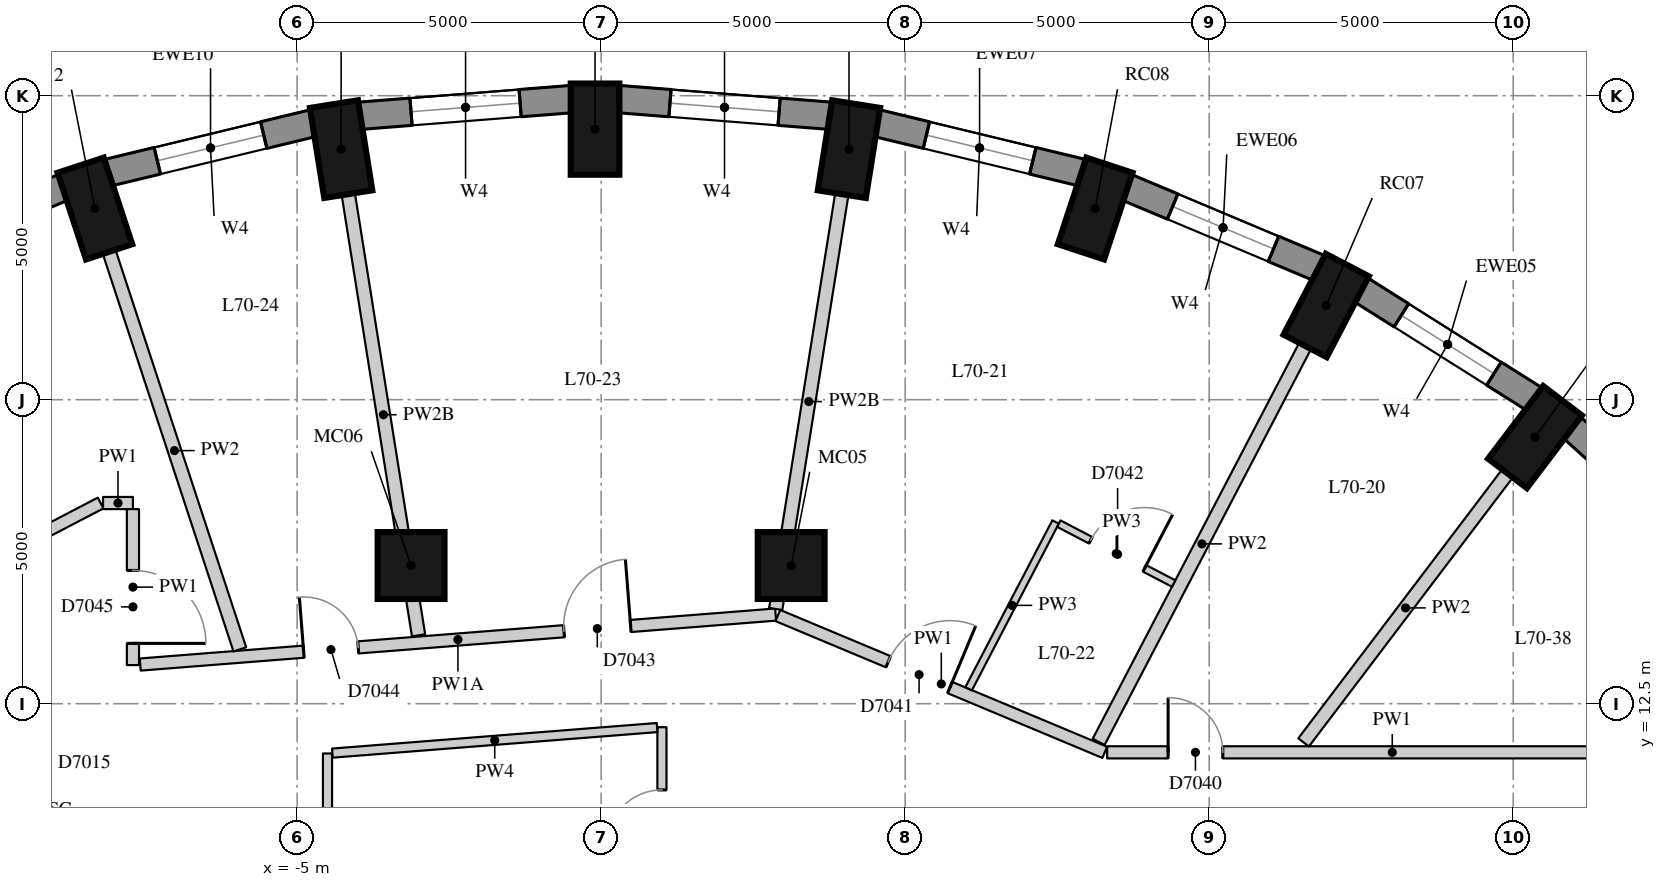
"""IFC4 building model, lengths in metres.
Left out: names, types, materials, properties, quantities, classifications, styles, units other than length and angle.
Written with IfcOpenShell. Run it as: python <this file> out.ifc"""

import sys

from ifc_helpers import new_model, si_unit, direction, frame, frame_2d, origin, origin_2d, place, context, subcontext, project, spatial, rectangle, extrude, element, fill, save


model = new_model("IFC4")
c1 = context("Model", 3, precision=1e-05, world=origin(), true_north=direction((0.0, 1.0)))
c2 = subcontext(c1, "Body", "Model", "MODEL_VIEW")
j1 = project(units=[si_unit("LENGTHUNIT", "METRE"), si_unit("PLANEANGLEUNIT", "RADIAN")], contexts=[c1])
p1 = place(None, origin())
s1 = spatial("IfcSite", under=j1, at=p1, CompositionType="ELEMENT")
p2 = place(p1, origin())
s2 = spatial("IfcBuilding", under=s1, at=p2, CompositionType="ELEMENT")
p3 = place(p2, frame((0.0, 0.0, 246.5)))
s3 = spatial("IfcBuildingStorey", under=s2, at=p3, CompositionType="ELEMENT", Elevation=246.5)
for number, where, z_axis, x_axis in (
    (1, (15.359, 16.885, 0.0), (0.0, 0.0, 1.0), (0.604, 0.797, 0.0)),
    (2, (11.925, 19.05, 0.0), (0.0, 0.0, 1.0), (0.462, 0.887, 0.0)),
    (3, (8.125, 20.644, 0.0), (0.0, 0.0, 1.0), (0.312, 0.95, 0.0)),
    (4, (4.076, 21.621, 0.0), (0.0, 0.0, 1.0), (0.157, 0.988, 0.0)),
    (5, (-0.1, 21.95, 0.0), (0.0, 0.0, 1.0), (0.0, 1.0, 0.0)),
    (6, (-4.276, 21.621, 0.0), (0.0, 0.0, 1.0), (-0.157, 0.988, 0.0)),
    (7, (-8.326, 20.644, 0.0), (0.0, 0.0, 1.0), (-0.312, 0.95, 0.0)),
):
    element("IfcColumn", number, at=place(p3, frame(where, z_axis=z_axis, x_axis=x_axis)), inside=s3, PredefinedType="COLUMN", context=c2, shape_type="SweptSolid", body=[
        extrude(rectangle(XDim=1.5, YDim=0.8, at=origin_2d()), origin(), (0.0, 0.0, 1.0), 3.3),
    ])
for number, where, z_axis, x_axis in (
    (8, (3.126, 14.772, 0.0), (0.0, 0.0, 1.0), (1.0, 0.0, 0.0)),
    (9, (-3.126, 14.772, 0.0), (0.0, 0.0, 1.0), (1.0, 0.0, 0.0)),
):
    element("IfcColumn", number, at=place(p3, frame(where, z_axis=z_axis, x_axis=x_axis)), inside=s3, PredefinedType="COLUMN", context=c2, shape_type="SweptSolid", body=[
        extrude(rectangle(XDim=1.1, YDim=1.1, at=origin_2d()), origin(), (0.0, 0.0, 1.0), 3.3),
    ])
p4 = place(p3, frame((18.424, 14.828, 0.0), z_axis=(0.0, 0.0, 1.0), x_axis=(-0.743166014219, 0.669107073128, 0.0)))
e10 = element("IfcWall", 10, at=p4, inside=s3, PredefinedType="SOLIDWALL", context=c2, shape_type="SweptSolid", body=[
    extrude(rectangle(XDim=3.316, YDim=0.45, at=frame_2d((1.658, 0.0))), origin(), (0.0, 0.0, 1.0), 3.02),
])
p5 = place(p3, frame((15.353, 17.506, 0.0), z_axis=(0.0, 0.0, 1.0), x_axis=(-0.845929139811, 0.53329531258, 0.0)))
e11 = element("IfcWall", 11, at=p5, inside=s3, PredefinedType="SOLIDWALL", context=c2, shape_type="SweptSolid", body=[
    extrude(rectangle(XDim=3.385, YDim=0.45, at=frame_2d((1.692, 0.0))), origin(), (0.0, 0.0, 1.0), 3.02),
])
p6 = place(p5, frame((0.792, 0.0, 0.4)))
e12 = element("IfcOpeningElement", 12, at=p6, cuts=e11, PredefinedType="OPENING", context=c2, shape_type="SweptSolid", body=[
    extrude(rectangle(XDim=1.8, YDim=1.75, at=frame_2d((0.9, 0.875))), frame((0.0, 0.235, 0.0), z_axis=(0.0, -1.0, 0.0), x_axis=(1.0, 0.0, 0.0)), (0.0, 0.0, 1.0), 0.47),
])
p7 = place(p3, frame((11.816, 19.662, 0.0), z_axis=(0.0, 0.0, 1.0), x_axis=(-0.922024627475, 0.387131226239, 0.0)))
e13 = element("IfcWall", 13, at=p7, inside=s3, PredefinedType="SOLIDWALL", context=c2, shape_type="SweptSolid", body=[
    extrude(rectangle(XDim=3.443, YDim=0.45, at=frame_2d((1.722, 0.0))), origin(), (0.0, 0.0, 1.0), 3.02),
])
p8 = place(p7, frame((0.822, 0.0, 0.4)))
e14 = element("IfcOpeningElement", 14, at=p8, cuts=e13, PredefinedType="OPENING", context=c2, shape_type="SweptSolid", body=[
    extrude(rectangle(XDim=1.8, YDim=1.75, at=frame_2d((0.9, 0.875))), frame((0.0, 0.235, 0.0), z_axis=(0.0, -1.0, 0.0), x_axis=(1.0, 0.0, 0.0)), (0.0, 0.0, 1.0), 0.47),
])
p9 = place(p3, frame((7.919, 21.232, 0.0), z_axis=(0.0, 0.0, 1.0), x_axis=(-0.972099278496, 0.23456980357, 0.0)))
e15 = element("IfcWall", 15, at=p9, inside=s3, PredefinedType="SOLIDWALL", context=c2, shape_type="SweptSolid", body=[
    extrude(rectangle(XDim=3.487, YDim=0.45, at=frame_2d((1.743, 0.0))), origin(), (0.0, 0.0, 1.0), 3.02),
])
p10 = place(p9, frame((0.843, 0.0, 0.4)))
e16 = element("IfcOpeningElement", 16, at=p10, cuts=e15, PredefinedType="OPENING", context=c2, shape_type="SweptSolid", body=[
    extrude(rectangle(XDim=1.8, YDim=1.75, at=frame_2d((0.9, 0.875))), frame((0.0, 0.235, 0.0), z_axis=(0.0, -1.0, 0.0), x_axis=(1.0, 0.0, 0.0)), (0.0, 0.0, 1.0), 0.47),
])
p11 = place(p3, frame((3.779, 22.169, 0.0), z_axis=(0.0, 0.0, 1.0), x_axis=(-0.996910775835, 0.078542377245, 0.0)))
e17 = element("IfcWall", 17, at=p11, inside=s3, PredefinedType="SOLIDWALL", context=c2, shape_type="SweptSolid", body=[
    extrude(rectangle(XDim=3.509, YDim=0.45, at=frame_2d((1.755, 0.0))), origin(), (0.0, 0.0, 1.0), 3.02),
])
p12 = place(p11, frame((0.855, 0.0, 0.4)))
e18 = element("IfcOpeningElement", 18, at=p12, cuts=e17, PredefinedType="OPENING", context=c2, shape_type="SweptSolid", body=[
    extrude(rectangle(XDim=1.8, YDim=1.75, at=frame_2d((0.9, 0.875))), frame((0.0, 0.235, 0.0), z_axis=(0.0, -1.0, 0.0), x_axis=(1.0, 0.0, 0.0)), (0.0, 0.0, 1.0), 0.47),
])
p13 = place(p3, frame((-0.48, 22.444, 0.0), z_axis=(0.0, 0.0, 1.0), x_axis=(-0.996910775835, -0.078542377245, 0.0)))
e19 = element("IfcWall", 19, at=p13, inside=s3, PredefinedType="SOLIDWALL", context=c2, shape_type="SweptSolid", body=[
    extrude(rectangle(XDim=3.509, YDim=0.45, at=frame_2d((1.755, 0.0))), origin(), (0.0, 0.0, 1.0), 3.02),
])
p14 = place(p13, frame((0.855, 0.0, 0.4)))
e20 = element("IfcOpeningElement", 20, at=p14, cuts=e19, PredefinedType="OPENING", context=c2, shape_type="SweptSolid", body=[
    extrude(rectangle(XDim=1.8, YDim=1.75, at=frame_2d((0.9, 0.875))), frame((0.0, 0.235, 0.0), z_axis=(0.0, -1.0, 0.0), x_axis=(1.0, 0.0, 0.0)), (0.0, 0.0, 1.0), 0.47),
])
p15 = place(p3, frame((-4.729, 22.05, 0.0), z_axis=(0.0, 0.0, 1.0), x_axis=(-0.972099278496, -0.23456980357, 0.0)))
e21 = element("IfcWall", 21, at=p15, inside=s3, PredefinedType="SOLIDWALL", context=c2, shape_type="SweptSolid", body=[
    extrude(rectangle(XDim=3.487, YDim=0.45, at=frame_2d((1.743, 0.0))), origin(), (0.0, 0.0, 1.0), 3.02),
])
p16 = place(p15, frame((0.843, 0.0, 0.4)))
e22 = element("IfcOpeningElement", 22, at=p16, cuts=e21, PredefinedType="OPENING", context=c2, shape_type="SweptSolid", body=[
    extrude(rectangle(XDim=1.8, YDim=1.75, at=frame_2d((0.9, 0.875))), frame((0.0, 0.235, 0.0), z_axis=(0.0, -1.0, 0.0), x_axis=(1.0, 0.0, 0.0)), (0.0, 0.0, 1.0), 0.47),
])
p17 = place(p3, frame((-8.841, 20.995, 0.0), z_axis=(0.0, 0.0, 1.0), x_axis=(-0.922024627475, -0.387131226239, 0.0)))
e23 = element("IfcWall", 23, at=p17, inside=s3, PredefinedType="SOLIDWALL", context=c2, shape_type="SweptSolid", body=[
    extrude(rectangle(XDim=3.443, YDim=0.45, at=frame_2d((1.722, 0.0))), origin(), (0.0, 0.0, 1.0), 3.02),
])
p18 = place(p17, frame((0.822, 0.0, 0.4)))
e24 = element("IfcOpeningElement", 24, at=p18, cuts=e23, PredefinedType="OPENING", context=c2, shape_type="SweptSolid", body=[
    extrude(rectangle(XDim=1.8, YDim=1.75, at=frame_2d((0.9, 0.875))), frame((0.0, 0.235, 0.0), z_axis=(0.0, -1.0, 0.0), x_axis=(1.0, 0.0, 0.0)), (0.0, 0.0, 1.0), 0.47),
])
p19 = place(p3, frame((-11.534, 14.081, 0.0), z_axis=(0.0, 0.0, 1.0), x_axis=(0.886975089277, 0.461817270143, 0.0)))
e25 = element("IfcWall", 25, at=p19, inside=s3, PredefinedType="PARTITIONING", context=c2, shape_type="SweptSolid", body=[
    extrude(rectangle(XDim=3.723, YDim=0.2, at=frame_2d((1.861, 0.0))), origin(), (0.0, 0.0, 1.0), 3.02),
])
p20 = place(p3, frame((-8.192, 15.8, 0.0), z_axis=(0.0, 0.0, 1.0), x_axis=(1.0, 0.0, 0.0)))
e26 = element("IfcWall", 26, at=p20, inside=s3, PredefinedType="PARTITIONING", context=c2, shape_type="SweptSolid", body=[
    extrude(rectangle(XDim=0.492, YDim=0.2, at=frame_2d((0.246, 0.0))), origin(), (0.0, 0.0, 1.0), 3.02),
])
p21 = place(p3, frame((-7.7, 15.7, 0.0), z_axis=(0.0, 0.0, 1.0), x_axis=(0.0, -1.0, 0.0)))
e27 = element("IfcWall", 27, at=p21, inside=s3, PredefinedType="PARTITIONING", context=c2, shape_type="SweptSolid", body=[
    extrude(rectangle(XDim=2.565, YDim=0.2, at=frame_2d((1.282, 0.0))), origin(), (0.0, 0.0, 1.0), 3.02),
])
p22 = place(p21, frame((1.008, 0.0, 0.0)))
e28 = element("IfcOpeningElement", 28, at=p22, cuts=e27, PredefinedType="OPENING", context=c2, shape_type="SweptSolid", body=[
    extrude(rectangle(XDim=1.2, YDim=2.1, at=frame_2d((0.6, 1.05))), frame((0.0, 0.11, 0.0), z_axis=(0.0, -1.0, 0.0), x_axis=(1.0, 0.0, 0.0)), (0.0, 0.0, 1.0), 0.22),
])
p23 = place(p3, frame((-7.58, 13.144, 0.0), z_axis=(0.0, 0.0, 1.0), x_axis=(0.996921908045, 0.078400951905, 0.0)))
e29 = element("IfcWall", 29, at=p23, inside=s3, PredefinedType="PARTITIONING", context=c2, shape_type="SweptSolid", body=[
    extrude(rectangle(XDim=10.482, YDim=0.2, at=frame_2d((5.241, 0.0))), origin(), (0.0, 0.0, 1.0), 2.57),
])
p24 = place(p23, frame((6.99, 0.0, 0.0)))
e30 = element("IfcOpeningElement", 30, at=p24, cuts=e29, PredefinedType="OPENING", context=c2, shape_type="SweptSolid", body=[
    extrude(rectangle(XDim=1.1, YDim=2.1, at=frame_2d((0.55, 1.05))), frame((0.0, 0.11, 0.0), z_axis=(0.0, -1.0, 0.0), x_axis=(1.0, 0.0, 0.0)), (0.0, 0.0, 1.0), 0.22),
])
p25 = place(p23, frame((2.696, 0.0, 0.0)))
e31 = element("IfcOpeningElement", 31, at=p25, cuts=e29, PredefinedType="OPENING", context=c2, shape_type="SweptSolid", body=[
    extrude(rectangle(XDim=0.9, YDim=2.1, at=frame_2d((0.45, 1.05))), frame((0.0, 0.11, 0.0), z_axis=(0.0, -1.0, 0.0), x_axis=(1.0, 0.0, 0.0)), (0.0, 0.0, 1.0), 0.22),
])
p26 = place(p3, frame((2.907, 13.95, 0.0), z_axis=(0.0, 0.0, 1.0), x_axis=(0.922453481254, -0.386108242494, 0.0)))
e32 = element("IfcWall", 32, at=p26, inside=s3, PredefinedType="PARTITIONING", context=c2, shape_type="SweptSolid", body=[
    extrude(rectangle(XDim=5.827, YDim=0.2, at=frame_2d((2.914, 0.0))), origin(), (0.0, 0.0, 1.0), 3.02),
])
p27 = place(p26, frame((1.968, 0.0, 0.0)))
e33 = element("IfcOpeningElement", 33, at=p27, cuts=e32, PredefinedType="OPENING", context=c2, shape_type="SweptSolid", body=[
    extrude(rectangle(XDim=1.1, YDim=2.1, at=frame_2d((0.55, 1.05))), frame((0.0, 0.11, 0.0), z_axis=(0.0, -1.0, 0.0), x_axis=(1.0, 0.0, 0.0)), (0.0, 0.0, 1.0), 0.22),
])
p28 = place(p3, frame((8.322, 11.7, 0.0), z_axis=(0.0, 0.0, 1.0), x_axis=(1.0, 0.0, 0.0)))
e34 = element("IfcWall", 34, at=p28, inside=s3, PredefinedType="PARTITIONING", context=c2, shape_type="SweptSolid", body=[
    extrude(rectangle(XDim=9.378, YDim=0.2, at=frame_2d((4.689, 0.0))), origin(), (0.0, 0.0, 1.0), 3.02),
])
p29 = place(p28, frame((1.002, 0.0, 0.0)))
e35 = element("IfcOpeningElement", 35, at=p29, cuts=e34, PredefinedType="OPENING", context=c2, shape_type="SweptSolid", body=[
    extrude(rectangle(XDim=0.9, YDim=2.1, at=frame_2d((0.45, 1.05))), frame((0.0, 0.11, 0.0), z_axis=(0.0, -1.0, 0.0), x_axis=(1.0, 0.0, 0.0)), (0.0, 0.0, 1.0), 0.22),
])
p30 = place(p3, frame((1.0, 12.113, 0.0), z_axis=(0.0, 0.0, 1.0), x_axis=(0.0, -1.0, 0.0)))
e36 = element("IfcWall", 36, at=p30, inside=s3, PredefinedType="PARTITIONING", context=c2, shape_type="SweptSolid", body=[
    extrude(rectangle(XDim=2.963, YDim=0.15, at=frame_2d((1.482, 0.0))), origin(), (0.0, 0.0, 1.0), 3.02),
])
p31 = place(p30, frame((1.032, 0.0, 0.0)))
e37 = element("IfcOpeningElement", 37, at=p31, cuts=e36, PredefinedType="OPENING", context=c2, shape_type="SweptSolid", body=[
    extrude(rectangle(XDim=0.9, YDim=2.1, at=frame_2d((0.45, 1.05))), frame((0.0, 0.085, 0.0), z_axis=(0.0, -1.0, 0.0), x_axis=(1.0, 0.0, 0.0)), (0.0, 0.0, 1.0), 0.17),
])
p32 = place(p3, frame((-4.5, 7.735, 0.0), z_axis=(0.0, 0.0, 1.0), x_axis=(0.0, 1.0, 0.0)))
e38 = element("IfcWall", 38, at=p32, inside=s3, PredefinedType="PARTITIONING", context=c2, shape_type="SweptSolid", body=[
    extrude(rectangle(XDim=3.946, YDim=0.15, at=frame_2d((1.973, 0.0))), origin(), (0.0, 0.0, 1.0), 3.02),
])
p33 = place(p3, frame((-4.42, 11.687, 0.0), z_axis=(0.0, 0.0, 1.0), x_axis=(0.996915064954, 0.078487917971, 0.0)))
e39 = element("IfcWall", 39, at=p33, inside=s3, PredefinedType="PARTITIONING", context=c2, shape_type="SweptSolid", body=[
    extrude(rectangle(XDim=5.356, YDim=0.15, at=frame_2d((2.678, 0.0))), origin(), (0.0, 0.0, 1.0), 3.02),
])
p34 = place(p3, frame((14.906, 16.287, 0.0), z_axis=(0.0, 0.0, 1.0), x_axis=(-0.604066831727, -0.796933662739, 0.0)))
e40 = element("IfcWall", 40, at=p34, inside=s3, PredefinedType="PARTITIONING", context=c2, shape_type="SweptSolid", body=[
    extrude(rectangle(XDim=5.551, YDim=0.22, at=frame_2d((2.775, 0.0))), origin(), (0.0, 0.0, 1.0), 3.02),
])
p35 = place(p3, frame((11.578, 18.385, 0.0), z_axis=(0.0, 0.0, 1.0), x_axis=(-0.462372875873, -0.886685583314, 0.0)))
e41 = element("IfcWall", 41, at=p35, inside=s3, PredefinedType="PARTITIONING", context=c2, shape_type="SweptSolid", body=[
    extrude(rectangle(XDim=7.345, YDim=0.22, at=frame_2d((3.672, 0.0))), origin(), (0.0, 0.0, 1.0), 3.02),
])
p36 = place(p3, frame((3.958, 20.88, 0.0), z_axis=(0.0, 0.0, 1.0), x_axis=(-0.157259964952, -0.987557240581, 0.0)))
e42 = element("IfcWall", 42, at=p36, inside=s3, PredefinedType="PARTITIONING", context=c2, shape_type="SweptSolid", body=[
    extrude(rectangle(XDim=6.908, YDim=0.22, at=frame_2d((3.454, 0.0))), origin(), (0.0, 0.0, 1.0), 2.57),
])
p37 = place(p3, frame((-4.158, 20.88, 0.0), z_axis=(0.0, 0.0, 1.0), x_axis=(0.157271196312, -0.987555452018, 0.0)))
e43 = element("IfcWall", 43, at=p37, inside=s3, PredefinedType="PARTITIONING", context=c2, shape_type="SweptSolid", body=[
    extrude(rectangle(XDim=7.347, YDim=0.22, at=frame_2d((3.674, 0.0))), origin(), (0.0, 0.0, 1.0), 2.57),
])
p38 = place(p3, frame((-8.091, 19.932, 0.0), z_axis=(0.0, 0.0, 1.0), x_axis=(0.312277225251, -0.949991018162, 0.0)))
e44 = element("IfcWall", 44, at=p38, inside=s3, PredefinedType="PARTITIONING", context=c2, shape_type="SweptSolid", body=[
    extrude(rectangle(XDim=6.883, YDim=0.22, at=frame_2d((3.441, 0.0))), origin(), (0.0, 0.0, 1.0), 3.02),
])
p39 = place(p3, frame((6.044, 12.745, 0.0), z_axis=(0.0, 0.0, 1.0), x_axis=(0.462331372195, 0.886707224672, 0.0)))
e45 = element("IfcWall", 45, at=p39, inside=s3, PredefinedType="PARTITIONING", context=c2, shape_type="SweptSolid", body=[
    extrude(rectangle(XDim=3.094, YDim=0.12, at=frame_2d((1.547, 0.0))), origin(), (0.0, 0.0, 1.0), 3.02),
])
p40 = place(p3, frame((7.527, 15.461, 0.0), z_axis=(0.0, 0.0, 1.0), x_axis=(0.88668701022, -0.462370139507, 0.0)))
e46 = element("IfcWall", 46, at=p40, inside=s3, PredefinedType="PARTITIONING", context=c2, shape_type="SweptSolid", body=[
    extrude(rectangle(XDim=2.13, YDim=0.12, at=frame_2d((1.065, 0.0))), origin(), (0.0, 0.0, 1.0), 3.02),
])
p41 = place(p40, frame((0.59, 0.0, 0.0)))
e47 = element("IfcOpeningElement", 47, at=p41, cuts=e46, PredefinedType="OPENING", context=c2, shape_type="SweptSolid", body=[
    extrude(rectangle(XDim=1.0, YDim=2.1, at=frame_2d((0.5, 1.05))), frame((0.0, 0.07, 0.0), z_axis=(0.0, -1.0, 0.0), x_axis=(1.0, 0.0, 0.0)), (0.0, 0.0, 1.0), 0.14),
])
p42 = place(p6, origin())
e48 = element("IfcWindow", 48, at=p42, inside=s3, PartitioningType="SINGLE_PANEL", PredefinedType="WINDOW", context=c2, shape_type="SweptSolid", body=[
    extrude(rectangle(XDim=1.8, YDim=1.75, at=frame_2d((0.9, 0.875))), frame((0.0, 0.035, 0.0), z_axis=(0.0, -1.0, 0.0), x_axis=(1.0, 0.0, 0.0)), (0.0, 0.0, 1.0), 0.06),
])
fill(e12, e48)
p43 = place(p8, origin())
e49 = element("IfcWindow", 49, at=p43, inside=s3, PartitioningType="SINGLE_PANEL", PredefinedType="WINDOW", context=c2, shape_type="SweptSolid", body=[
    extrude(rectangle(XDim=1.8, YDim=1.75, at=frame_2d((0.9, 0.875))), frame((0.0, 0.035, 0.0), z_axis=(0.0, -1.0, 0.0), x_axis=(1.0, 0.0, 0.0)), (0.0, 0.0, 1.0), 0.06),
])
fill(e14, e49)
p44 = place(p10, origin())
e50 = element("IfcWindow", 50, at=p44, inside=s3, PartitioningType="SINGLE_PANEL", PredefinedType="WINDOW", context=c2, shape_type="SweptSolid", body=[
    extrude(rectangle(XDim=1.8, YDim=1.75, at=frame_2d((0.9, 0.875))), frame((0.0, 0.035, 0.0), z_axis=(0.0, -1.0, 0.0), x_axis=(1.0, 0.0, 0.0)), (0.0, 0.0, 1.0), 0.06),
])
fill(e16, e50)
p45 = place(p12, origin())
e51 = element("IfcWindow", 51, at=p45, inside=s3, PartitioningType="SINGLE_PANEL", PredefinedType="WINDOW", context=c2, shape_type="SweptSolid", body=[
    extrude(rectangle(XDim=1.8, YDim=1.75, at=frame_2d((0.9, 0.875))), frame((0.0, 0.035, 0.0), z_axis=(0.0, -1.0, 0.0), x_axis=(1.0, 0.0, 0.0)), (0.0, 0.0, 1.0), 0.06),
])
fill(e18, e51)
p46 = place(p14, origin())
e52 = element("IfcWindow", 52, at=p46, inside=s3, PartitioningType="SINGLE_PANEL", PredefinedType="WINDOW", context=c2, shape_type="SweptSolid", body=[
    extrude(rectangle(XDim=1.8, YDim=1.75, at=frame_2d((0.9, 0.875))), frame((0.0, 0.035, 0.0), z_axis=(0.0, -1.0, 0.0), x_axis=(1.0, 0.0, 0.0)), (0.0, 0.0, 1.0), 0.06),
])
fill(e20, e52)
p47 = place(p16, origin())
e53 = element("IfcWindow", 53, at=p47, inside=s3, PartitioningType="SINGLE_PANEL", PredefinedType="WINDOW", context=c2, shape_type="SweptSolid", body=[
    extrude(rectangle(XDim=1.8, YDim=1.75, at=frame_2d((0.9, 0.875))), frame((0.0, 0.035, 0.0), z_axis=(0.0, -1.0, 0.0), x_axis=(1.0, 0.0, 0.0)), (0.0, 0.0, 1.0), 0.06),
])
fill(e22, e53)
p48 = place(p29, origin())
e54 = element("IfcDoor", 54, at=p48, inside=s3, OperationType="SINGLE_SWING_LEFT", PredefinedType="DOOR", context=c2, shape_type="SweptSolid", body=[
    extrude(rectangle(XDim=0.9, YDim=2.1, at=frame_2d((0.45, 1.05))), frame((0.0, 0.025, 0.0), z_axis=(0.0, -1.0, 0.0), x_axis=(1.0, 0.0, 0.0)), (0.0, 0.0, 1.0), 0.05),
])
fill(e35, e54)
p49 = place(p27, origin())
e55 = element("IfcDoor", 55, at=p49, inside=s3, OperationType="SINGLE_SWING_RIGHT", PredefinedType="DOOR", context=c2, shape_type="SweptSolid", body=[
    extrude(rectangle(XDim=1.1, YDim=2.1, at=frame_2d((0.55, 1.05))), frame((0.0, 0.025, 0.0), z_axis=(0.0, -1.0, 0.0), x_axis=(1.0, 0.0, 0.0)), (0.0, 0.0, 1.0), 0.05),
])
fill(e33, e55)
p50 = place(p41, origin())
e56 = element("IfcDoor", 56, at=p50, inside=s3, OperationType="SINGLE_SWING_RIGHT", PredefinedType="DOOR", context=c2, shape_type="SweptSolid", body=[
    extrude(rectangle(XDim=1.0, YDim=2.1, at=frame_2d((0.5, 1.05))), frame((0.0, 0.025, 0.0), z_axis=(0.0, -1.0, 0.0), x_axis=(1.0, 0.0, 0.0)), (0.0, 0.0, 1.0), 0.05),
])
fill(e47, e56)
p51 = place(p24, origin())
e57 = element("IfcDoor", 57, at=p51, inside=s3, OperationType="SINGLE_SWING_RIGHT", PredefinedType="DOOR", context=c2, shape_type="SweptSolid", body=[
    extrude(rectangle(XDim=1.1, YDim=2.1, at=frame_2d((0.55, 1.05))), frame((0.0, 0.025, 0.0), z_axis=(0.0, -1.0, 0.0), x_axis=(1.0, 0.0, 0.0)), (0.0, 0.0, 1.0), 0.05),
])
fill(e30, e57)
p52 = place(p25, origin())
e58 = element("IfcDoor", 58, at=p52, inside=s3, OperationType="SINGLE_SWING_LEFT", PredefinedType="DOOR", context=c2, shape_type="SweptSolid", body=[
    extrude(rectangle(XDim=0.9, YDim=2.1, at=frame_2d((0.45, 1.05))), frame((0.0, 0.025, 0.0), z_axis=(0.0, -1.0, 0.0), x_axis=(1.0, 0.0, 0.0)), (0.0, 0.0, 1.0), 0.05),
])
fill(e31, e58)
p53 = place(p22, origin())
e59 = element("IfcDoor", 59, at=p53, inside=s3, OperationType="SINGLE_SWING_RIGHT", PredefinedType="DOOR", context=c2, shape_type="SweptSolid", body=[
    extrude(rectangle(XDim=1.2, YDim=2.1, at=frame_2d((0.6, 1.05))), frame((0.0, 0.025, 0.0), z_axis=(0.0, -1.0, 0.0), x_axis=(1.0, 0.0, 0.0)), (0.0, 0.0, 1.0), 0.05),
])
fill(e28, e59)
p54 = place(p31, origin())
e60 = element("IfcDoor", 60, at=p54, inside=s3, OperationType="SINGLE_SWING_LEFT", PredefinedType="DOOR", context=c2, shape_type="SweptSolid", body=[
    extrude(rectangle(XDim=0.9, YDim=2.1, at=frame_2d((0.45, 1.05))), frame((0.0, 0.025, 0.0), z_axis=(0.0, -1.0, 0.0), x_axis=(1.0, 0.0, 0.0)), (0.0, 0.0, 1.0), 0.05),
])
fill(e37, e60)
save(model, sys.argv[1])
